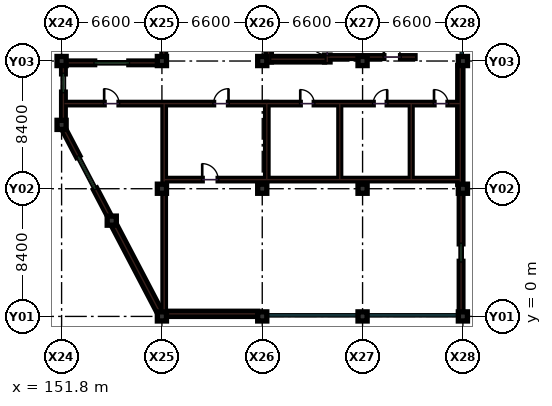
"""IFC4 building model, lengths in metres.
Left out: names, types, materials, properties, quantities, classifications, styles, units other than length and angle.
Written with IfcOpenShell. Run it as: python <this file> out.ifc"""

import sys

from ifc_helpers import new_model, si_unit, direction, frame, frame_2d, origin, origin_2d, place, context, subcontext, project, spatial, rectangle, extrude, element, fill, save


model = new_model("IFC4")
c1 = context("Model", 3, precision=1e-05, world=origin(), true_north=direction((0.0, 1.0)))
c2 = subcontext(c1, "Body", "Model", "MODEL_VIEW")
j1 = project(units=[si_unit("LENGTHUNIT", "METRE"), si_unit("PLANEANGLEUNIT", "RADIAN")], contexts=[c1])
p1 = place(None, origin())
s1 = spatial("IfcSite", under=j1, at=p1, CompositionType="ELEMENT")
p2 = place(p1, origin())
s2 = spatial("IfcBuilding", under=s1, at=p2, CompositionType="ELEMENT")
p3 = place(p2, frame((0.0, 0.0, 35.4)))
s3 = spatial("IfcBuildingStorey", under=s2, at=p3, CompositionType="ELEMENT", Elevation=35.4)
for number, where, z_axis, x_axis in (
    (1, (151.8, 16.8, 0.0), (0.0, 0.0, 1.0), (1.0, 0.0, 0.0)),
    (2, (158.4, 0.0, 0.0), (0.0, 0.0, 1.0), (1.0, 0.0, 0.0)),
    (3, (158.4, 8.4, 0.0), (0.0, 0.0, 1.0), (1.0, 0.0, 0.0)),
    (4, (158.4, 16.8, 0.0), (0.0, 0.0, 1.0), (1.0, 0.0, 0.0)),
    (5, (165.0, 0.0, 0.0), (0.0, 0.0, 1.0), (1.0, 0.0, 0.0)),
    (6, (165.0, 8.4, 0.0), (0.0, 0.0, 1.0), (1.0, 0.0, 0.0)),
    (7, (165.0, 16.8, 0.0), (0.0, 0.0, 1.0), (1.0, 0.0, 0.0)),
    (8, (171.6, 0.0, 0.0), (0.0, 0.0, 1.0), (1.0, 0.0, 0.0)),
    (9, (171.6, 8.4, 0.0), (0.0, 0.0, 1.0), (1.0, 0.0, 0.0)),
    (10, (171.6, 16.8, 0.0), (0.0, 0.0, 1.0), (1.0, 0.0, 0.0)),
    (11, (178.2, 0.0, 0.0), (0.0, 0.0, 1.0), (1.0, 0.0, 0.0)),
    (12, (178.2, 8.4, 0.0), (0.0, 0.0, 1.0), (1.0, 0.0, 0.0)),
    (13, (178.2, 16.8, 0.0), (0.0, 0.0, 1.0), (1.0, 0.0, 0.0)),
    (14, (151.8, 12.6, 0.0), (0.0, 0.0, 1.0), (1.0, 0.0, 0.0)),
    (15, (155.1, 6.3, 0.0), (0.0, 0.0, 1.0), (1.0, 0.0, 0.0)),
):
    element("IfcColumn", number, at=place(p3, frame(where, z_axis=z_axis, x_axis=x_axis)), inside=s3, PredefinedType="COLUMN", context=c2, shape_type="SweptSolid", body=[
        extrude(rectangle(XDim=0.6, YDim=0.6, at=origin_2d()), origin(), (0.0, 0.0, 1.0), 3.9),
    ])
p4 = place(p3, frame((165.3, 14.0, 0.0), z_axis=(0.0, 0.0, 1.0), x_axis=(1.0, 0.0, 0.0)))
e16 = element("IfcWall", 16, at=p4, inside=s3, PredefinedType="PARTITIONING", context=c2, shape_type="SweptSolid", body=[
    extrude(rectangle(XDim=12.7, YDim=0.16, at=frame_2d((6.35, 0.0))), origin(), (0.0, 0.0, 1.0), 2.93),
])
p5 = place(p4, frame((2.2, 0.0, 0.0)))
e17 = element("IfcOpeningElement", 17, at=p5, cuts=e16, PredefinedType="OPENING", context=c2, shape_type="SweptSolid", body=[
    extrude(rectangle(XDim=0.92, YDim=2.08, at=frame_2d((0.46, 1.04))), frame((0.0, 0.09, 0.0), z_axis=(0.0, -1.0, 0.0), x_axis=(1.0, 0.0, 0.0)), (0.0, 0.0, 1.0), 0.18),
])
p6 = place(p4, frame((7.0, 0.0, 0.0)))
e18 = element("IfcOpeningElement", 18, at=p6, cuts=e16, PredefinedType="OPENING", context=c2, shape_type="SweptSolid", body=[
    extrude(rectangle(XDim=0.92, YDim=2.08, at=frame_2d((0.46, 1.04))), frame((0.0, 0.09, 0.0), z_axis=(0.0, -1.0, 0.0), x_axis=(1.0, 0.0, 0.0)), (0.0, 0.0, 1.0), 0.18),
])
p7 = place(p4, frame((11.0, 0.0, 0.0)))
e19 = element("IfcOpeningElement", 19, at=p7, cuts=e16, PredefinedType="OPENING", context=c2, shape_type="SweptSolid", body=[
    extrude(rectangle(XDim=0.92, YDim=2.08, at=frame_2d((0.46, 1.04))), frame((0.0, 0.09, 0.0), z_axis=(0.0, -1.0, 0.0), x_axis=(1.0, 0.0, 0.0)), (0.0, 0.0, 1.0), 0.18),
])
p8 = place(p3, frame((165.3, 9.0, 0.0), z_axis=(0.0, 0.0, 1.0), x_axis=(1.0, 0.0, 0.0)))
e20 = element("IfcWall", 20, at=p8, inside=s3, PredefinedType="PARTITIONING", context=c2, shape_type="SweptSolid", body=[
    extrude(rectangle(XDim=12.7, YDim=0.16, at=frame_2d((6.35, 0.0))), origin(), (0.0, 0.0, 1.0), 2.93),
])
p9 = place(p3, frame((165.3, 9.0, 0.0), z_axis=(0.0, 0.0, 1.0), x_axis=(0.0, 1.0, 0.0)))
e21 = element("IfcWall", 21, at=p9, inside=s3, PredefinedType="PARTITIONING", context=c2, shape_type="SweptSolid", body=[
    extrude(rectangle(XDim=5.0, YDim=0.16, at=frame_2d((2.5, 0.0))), origin(), (0.0, 0.0, 1.0), 2.93),
])
for number, where, z_axis, x_axis in (
    (22, (170.1, 9.0, 0.0), (0.0, 0.0, 1.0), (0.0, 1.0, 0.0)),
    (23, (174.8, 9.0, 0.0), (0.0, 0.0, 1.0), (0.0, 1.0, 0.0)),
):
    element("IfcWall", number, at=place(p3, frame(where, z_axis=z_axis, x_axis=x_axis)), inside=s3, PredefinedType="PARTITIONING", context=c2, shape_type="SweptSolid", body=[
        extrude(rectangle(XDim=5.0, YDim=0.12, at=frame_2d((2.5, 0.0))), origin(), (0.0, 0.0, 1.0), 2.93),
    ])
p10 = place(p3, frame((158.55, 9.0, 0.0), z_axis=(0.0, 0.0, 1.0), x_axis=(1.0, 0.0, 0.0)))
e24 = element("IfcWall", 24, at=p10, inside=s3, PredefinedType="PARTITIONING", context=c2, shape_type="SweptSolid", body=[
    extrude(rectangle(XDim=6.75, YDim=0.16, at=frame_2d((3.375, 0.0))), origin(), (0.0, 0.0, 1.0), 2.93),
])
p11 = place(p10, frame((2.5, 0.0, 0.0)))
e25 = element("IfcOpeningElement", 25, at=p11, cuts=e24, PredefinedType="OPENING", context=c2, shape_type="SweptSolid", body=[
    extrude(rectangle(XDim=1.05, YDim=2.15, at=frame_2d((0.525, 1.075))), frame((0.0, 0.09, 0.0), z_axis=(0.0, -1.0, 0.0), x_axis=(1.0, 0.0, 0.0)), (0.0, 0.0, 1.0), 0.18),
])
p12 = place(p3, frame((158.55, 0.25, 0.0), z_axis=(0.0, 0.0, 1.0), x_axis=(0.0, 1.0, 0.0)))
e26 = element("IfcWall", 26, at=p12, inside=s3, PredefinedType="PARTITIONING", context=c2, shape_type="SweptSolid", body=[
    extrude(rectangle(XDim=7.7, YDim=0.16, at=frame_2d((3.85, 0.0))), origin(), (0.0, 0.0, 1.0), 2.93),
])
p13 = place(p3, frame((158.55, 8.85, 0.0), z_axis=(0.0, 0.0, 1.0), x_axis=(0.0, 1.0, 0.0)))
e27 = element("IfcWall", 27, at=p13, inside=s3, PredefinedType="PARTITIONING", context=c2, shape_type="SweptSolid", body=[
    extrude(rectangle(XDim=5.15, YDim=0.16, at=frame_2d((2.575, 0.0))), origin(), (0.0, 0.0, 1.0), 2.93),
])
p14 = place(p3, frame((152.0, 14.0, 0.0), z_axis=(0.0, 0.0, 1.0), x_axis=(1.0, 0.0, 0.0)))
e28 = element("IfcWall", 28, at=p14, inside=s3, PredefinedType="PARTITIONING", context=c2, shape_type="SweptSolid", body=[
    extrude(rectangle(XDim=13.3, YDim=0.16, at=frame_2d((6.65, 0.0))), origin(), (0.0, 0.0, 1.0), 2.93),
])
p15 = place(p14, frame((2.6, 0.0, 0.0)))
e29 = element("IfcOpeningElement", 29, at=p15, cuts=e28, PredefinedType="OPENING", context=c2, shape_type="SweptSolid", body=[
    extrude(rectangle(XDim=0.98, YDim=2.12, at=frame_2d((0.49, 1.06))), frame((0.0, 0.09, 0.0), z_axis=(0.0, -1.0, 0.0), x_axis=(1.0, 0.0, 0.0)), (0.0, 0.0, 1.0), 0.18),
])
p16 = place(p14, frame((9.8, 0.0, 0.0)))
e30 = element("IfcOpeningElement", 30, at=p16, cuts=e28, PredefinedType="OPENING", context=c2, shape_type="SweptSolid", body=[
    extrude(rectangle(XDim=0.98, YDim=2.12, at=frame_2d((0.49, 1.06))), frame((0.0, 0.09, 0.0), z_axis=(0.0, -1.0, 0.0), x_axis=(1.0, 0.0, 0.0)), (0.0, 0.0, 1.0), 0.18),
])
p17 = place(p3, frame((158.105, 16.68, 0.0), z_axis=(0.0, 0.0, 1.0), x_axis=(-1.0, 0.0, 0.0)))
e31 = element("IfcWall", 31, at=p17, inside=s3, PredefinedType="SOLIDWALL", context=c2, shape_type="SweptSolid", body=[
    extrude(rectangle(XDim=6.01, YDim=0.24, at=frame_2d((3.005, 0.0))), origin(), (0.0, 0.0, 1.0), 3.015),
])
p18 = place(p17, frame((1.88, 0.0, 0.95)))
e32 = element("IfcOpeningElement", 32, at=p18, cuts=e31, PredefinedType="OPENING", context=c2, shape_type="SweptSolid", body=[
    extrude(rectangle(XDim=2.25, YDim=1.55, at=frame_2d((1.125, 0.775))), frame((0.0, 0.13, 0.0), z_axis=(0.0, -1.0, 0.0), x_axis=(1.0, 0.0, 0.0)), (0.0, 0.0, 1.0), 0.26),
])
p19 = place(p3, frame((158.695, 0.17, 0.0), z_axis=(0.0, 0.0, 1.0), x_axis=(1.0, 0.0, 0.0)))
e33 = element("IfcWall", 33, at=p19, inside=s3, PredefinedType="SHEAR", context=c2, shape_type="SweptSolid", body=[
    extrude(rectangle(XDim=6.01, YDim=0.34, at=frame_2d((3.005, 0.0))), origin(), (0.0, 0.0, 1.0), 3.68),
])
p20 = place(p3, frame((158.52, 24.905, 0.0), z_axis=(0.0, 0.0, 1.0), x_axis=(0.0, -1.0, 0.0)))
e34 = element("IfcWall", 34, at=p20, inside=s3, PredefinedType="SOLIDWALL", context=c2, shape_type="SweptSolid", body=[
    extrude(rectangle(XDim=7.81, YDim=0.24, at=frame_2d((3.905, 0.0))), origin(), (0.0, 0.0, 1.0), 3.065),
])
p21 = place(p20, frame((3.005, 0.0, 0.95)))
e35 = element("IfcOpeningElement", 35, at=p21, cuts=e34, PredefinedType="OPENING", context=c2, shape_type="SweptSolid", body=[
    extrude(rectangle(XDim=1.8, YDim=1.6, at=frame_2d((0.9, 0.8))), frame((0.0, 0.13, 0.0), z_axis=(0.0, -1.0, 0.0), x_axis=(1.0, 0.0, 0.0)), (0.0, 0.0, 1.0), 0.26),
])
p22 = place(p3, frame((178.08, 0.295, 0.0), z_axis=(0.0, 0.0, 1.0), x_axis=(0.0, 1.0, 0.0)))
e36 = element("IfcWall", 36, at=p22, inside=s3, PredefinedType="SOLIDWALL", context=c2, shape_type="SweptSolid", body=[
    extrude(rectangle(XDim=7.81, YDim=0.24, at=frame_2d((3.905, 0.0))), origin(), (0.0, 0.0, 1.0), 3.065),
])
p23 = place(p22, frame((3.33, 0.0, 0.95)))
e37 = element("IfcOpeningElement", 37, at=p23, cuts=e36, PredefinedType="OPENING", context=c2, shape_type="SweptSolid", body=[
    extrude(rectangle(XDim=1.15, YDim=1.6, at=frame_2d((0.575, 0.8))), frame((0.0, 0.13, 0.0), z_axis=(0.0, -1.0, 0.0), x_axis=(1.0, 0.0, 0.0)), (0.0, 0.0, 1.0), 0.26),
])
p24 = place(p3, frame((178.03, 8.695, 0.0), z_axis=(0.0, 0.0, 1.0), x_axis=(0.0, 1.0, 0.0)))
e38 = element("IfcWall", 38, at=p24, inside=s3, PredefinedType="SHEAR", context=c2, shape_type="SweptSolid", body=[
    extrude(rectangle(XDim=7.81, YDim=0.34, at=frame_2d((3.905, 0.0))), origin(), (0.0, 0.0, 1.0), 3.68),
])
p25 = place(p3, frame((151.92, 16.505, 0.0), z_axis=(0.0, 0.0, 1.0), x_axis=(0.0, -1.0, 0.0)))
e39 = element("IfcWall", 39, at=p25, inside=s3, PredefinedType="SOLIDWALL", context=c2, shape_type="SweptSolid", body=[
    extrude(rectangle(XDim=3.61, YDim=0.24, at=frame_2d((1.805, 0.0))), origin(), (0.0, 0.0, 1.0), 3.065),
])
p26 = place(p25, frame((0.55, 0.0, 0.95)))
e40 = element("IfcOpeningElement", 40, at=p26, cuts=e39, PredefinedType="OPENING", context=c2, shape_type="SweptSolid", body=[
    extrude(rectangle(XDim=1.2, YDim=1.5, at=frame_2d((0.6, 0.75))), frame((0.0, 0.13, 0.0), z_axis=(0.0, -1.0, 0.0), x_axis=(1.0, 0.0, 0.0)), (0.0, 0.0, 1.0), 0.26),
])
p27 = place(p3, frame((151.95, 12.31, 0.0), z_axis=(0.0, 0.0, 1.0), x_axis=(0.464471613901, -0.885588007981, 0.0)))
e41 = element("IfcWall", 41, at=p27, inside=s3, PredefinedType="SOLIDWALL", context=c2, shape_type="SweptSolid", body=[
    extrude(rectangle(XDim=6.459, YDim=0.24, at=frame_2d((3.229, 0.0))), origin(), (0.0, 0.0, 1.0), 3.065),
])
p28 = place(p27, frame((2.03, 0.0, 0.95)))
e42 = element("IfcOpeningElement", 42, at=p28, cuts=e41, PredefinedType="OPENING", context=c2, shape_type="SweptSolid", body=[
    extrude(rectangle(XDim=2.4, YDim=1.6, at=frame_2d((1.2, 0.8))), frame((0.0, 0.13, 0.0), z_axis=(0.0, -1.0, 0.0), x_axis=(1.0, 0.0, 0.0)), (0.0, 0.0, 1.0), 0.26),
])
p29 = place(p3, frame((155.25, 6.01, 0.0), z_axis=(0.0, 0.0, 1.0), x_axis=(0.464471613901, -0.885588007981, 0.0)))
e43 = element("IfcWall", 43, at=p29, inside=s3, PredefinedType="SHEAR", context=c2, shape_type="SweptSolid", body=[
    extrude(rectangle(XDim=6.459, YDim=0.34, at=frame_2d((3.229, 0.0))), origin(), (0.0, 0.0, 1.0), 3.68),
])
p30 = place(p3, frame((165.42, 16.74, 0.0), z_axis=(0.0, 0.0, 1.0), x_axis=(0.0, 1.0, 0.0)))
e44 = element("IfcWall", 44, at=p30, inside=s3, PredefinedType="SHEAR", context=c2, shape_type="SweptSolid", body=[
    extrude(rectangle(XDim=8.37, YDim=0.36, at=frame_2d((4.185, 0.0))), origin(), (0.0, 0.0, 1.0), 3.68),
])
p31 = place(p3, frame((169.28, 16.74, 0.0), z_axis=(0.0, 0.0, 1.0), x_axis=(0.0, 1.0, 0.0)))
e45 = element("IfcWall", 45, at=p31, inside=s3, PredefinedType="SHEAR", context=c2, shape_type="SweptSolid", body=[
    extrude(rectangle(XDim=8.37, YDim=0.36, at=frame_2d((4.185, 0.0))), origin(), (0.0, 0.0, 1.0), 3.68),
])
p32 = place(p31, frame((0.45, 0.0, 0.0)))
e46 = element("IfcOpeningElement", 46, at=p32, cuts=e45, PredefinedType="OPENING", context=c2, shape_type="SweptSolid", body=[
    extrude(rectangle(XDim=1.25, YDim=2.15, at=frame_2d((0.625, 1.075))), frame((0.0, 0.19, 0.0), z_axis=(0.0, -1.0, 0.0), x_axis=(1.0, 0.0, 0.0)), (0.0, 0.0, 1.0), 0.38),
])
p33 = place(p3, frame((165.6, 16.92, 0.0), z_axis=(0.0, 0.0, 1.0), x_axis=(1.0, 0.0, 0.0)))
e47 = element("IfcWall", 47, at=p33, inside=s3, PredefinedType="SHEAR", context=c2, shape_type="SweptSolid", body=[
    extrude(rectangle(XDim=3.5, YDim=0.36, at=frame_2d((1.75, 0.0))), origin(), (0.0, 0.0, 1.0), 3.68),
])
p34 = place(p3, frame((169.35, 17.06, 0.0), z_axis=(0.0, 0.0, 1.0), x_axis=(1.0, 0.0, 0.0)))
e48 = element("IfcWall", 48, at=p34, inside=s3, PredefinedType="SOLIDWALL", context=c2, shape_type="SweptSolid", body=[
    extrude(rectangle(XDim=5.7, YDim=0.18, at=frame_2d((2.85, 0.0))), origin(), (0.0, 0.0, 1.0), 3.015),
])
p35 = place(p34, frame((3.65, 0.0, 0.0)))
e49 = element("IfcOpeningElement", 49, at=p35, cuts=e48, PredefinedType="OPENING", context=c2, shape_type="SweptSolid", body=[
    extrude(rectangle(XDim=1.1, YDim=2.15, at=frame_2d((0.55, 1.075))), frame((0.0, 0.1, 0.0), z_axis=(0.0, -1.0, 0.0), x_axis=(1.0, 0.0, 0.0)), (0.0, 0.0, 1.0), 0.2),
])
p36 = place(p5, origin())
e50 = element("IfcDoor", 50, at=p36, inside=s3, OperationType="SINGLE_SWING_LEFT", PredefinedType="DOOR", context=c2, shape_type="SweptSolid", body=[
    extrude(rectangle(XDim=0.92, YDim=2.08, at=frame_2d((0.46, 1.04))), frame((0.0, 0.025, 0.0), z_axis=(0.0, -1.0, 0.0), x_axis=(1.0, 0.0, 0.0)), (0.0, 0.0, 1.0), 0.05),
])
fill(e17, e50)
p37 = place(p6, origin())
e51 = element("IfcDoor", 51, at=p37, inside=s3, OperationType="SINGLE_SWING_RIGHT", PredefinedType="DOOR", context=c2, shape_type="SweptSolid", body=[
    extrude(rectangle(XDim=0.92, YDim=2.08, at=frame_2d((0.46, 1.04))), frame((0.0, 0.025, 0.0), z_axis=(0.0, -1.0, 0.0), x_axis=(1.0, 0.0, 0.0)), (0.0, 0.0, 1.0), 0.05),
])
fill(e18, e51)
p38 = place(p7, origin())
e52 = element("IfcDoor", 52, at=p38, inside=s3, OperationType="SINGLE_SWING_LEFT", PredefinedType="DOOR", context=c2, shape_type="SweptSolid", body=[
    extrude(rectangle(XDim=0.92, YDim=2.08, at=frame_2d((0.46, 1.04))), frame((0.0, 0.025, 0.0), z_axis=(0.0, -1.0, 0.0), x_axis=(1.0, 0.0, 0.0)), (0.0, 0.0, 1.0), 0.05),
])
fill(e19, e52)
p39 = place(p11, origin())
e53 = element("IfcDoor", 53, at=p39, inside=s3, OperationType="SINGLE_SWING_LEFT", PredefinedType="DOOR", context=c2, shape_type="SweptSolid", body=[
    extrude(rectangle(XDim=1.05, YDim=2.15, at=frame_2d((0.525, 1.075))), frame((0.0, 0.025, 0.0), z_axis=(0.0, -1.0, 0.0), x_axis=(1.0, 0.0, 0.0)), (0.0, 0.0, 1.0), 0.05),
])
fill(e25, e53)
p40 = place(p15, origin())
e54 = element("IfcDoor", 54, at=p40, inside=s3, OperationType="SINGLE_SWING_LEFT", PredefinedType="DOOR", context=c2, shape_type="SweptSolid", body=[
    extrude(rectangle(XDim=0.98, YDim=2.12, at=frame_2d((0.49, 1.06))), frame((0.0, 0.025, 0.0), z_axis=(0.0, -1.0, 0.0), x_axis=(1.0, 0.0, 0.0)), (0.0, 0.0, 1.0), 0.05),
])
fill(e29, e54)
p41 = place(p16, origin())
e55 = element("IfcDoor", 55, at=p41, inside=s3, OperationType="SINGLE_SWING_RIGHT", PredefinedType="DOOR", context=c2, shape_type="SweptSolid", body=[
    extrude(rectangle(XDim=0.98, YDim=2.12, at=frame_2d((0.49, 1.06))), frame((0.0, 0.025, 0.0), z_axis=(0.0, -1.0, 0.0), x_axis=(1.0, 0.0, 0.0)), (0.0, 0.0, 1.0), 0.05),
])
fill(e30, e55)
p42 = place(p18, origin())
e56 = element("IfcWindow", 56, at=p42, inside=s3, PartitioningType="SINGLE_PANEL", PredefinedType="WINDOW", context=c2, shape_type="SweptSolid", body=[
    extrude(rectangle(XDim=2.25, YDim=1.55, at=frame_2d((1.125, 0.775))), frame((0.0, 0.03, 0.0), z_axis=(0.0, -1.0, 0.0), x_axis=(1.0, 0.0, 0.0)), (0.0, 0.0, 1.0), 0.06),
])
fill(e32, e56)
p43 = place(p23, origin())
e57 = element("IfcWindow", 57, at=p43, inside=s3, PartitioningType="SINGLE_PANEL", PredefinedType="WINDOW", context=c2, shape_type="SweptSolid", body=[
    extrude(rectangle(XDim=1.15, YDim=1.6, at=frame_2d((0.575, 0.8))), frame((0.0, 0.03, 0.0), z_axis=(0.0, -1.0, 0.0), x_axis=(1.0, 0.0, 0.0)), (0.0, 0.0, 1.0), 0.06),
])
fill(e37, e57)
p44 = place(p26, origin())
e58 = element("IfcWindow", 58, at=p44, inside=s3, PartitioningType="SINGLE_PANEL", PredefinedType="WINDOW", context=c2, shape_type="SweptSolid", body=[
    extrude(rectangle(XDim=1.2, YDim=1.5, at=frame_2d((0.6, 0.75))), frame((0.0, 0.03, 0.0), z_axis=(0.0, -1.0, 0.0), x_axis=(1.0, 0.0, 0.0)), (0.0, 0.0, 1.0), 0.06),
])
fill(e40, e58)
p45 = place(p28, origin())
e59 = element("IfcWindow", 59, at=p45, inside=s3, PartitioningType="SINGLE_PANEL", PredefinedType="WINDOW", context=c2, shape_type="SweptSolid", body=[
    extrude(rectangle(XDim=2.4, YDim=1.6, at=frame_2d((1.2, 0.8))), frame((0.0, 0.03, 0.0), z_axis=(0.0, -1.0, 0.0), x_axis=(1.0, 0.0, 0.0)), (0.0, 0.0, 1.0), 0.06),
])
fill(e42, e59)
p46 = place(p32, origin())
e60 = element("IfcDoor", 60, at=p46, inside=s3, OperationType="SINGLE_SWING_RIGHT", PredefinedType="DOOR", context=c2, shape_type="SweptSolid", body=[
    extrude(rectangle(XDim=1.25, YDim=2.15, at=frame_2d((0.625, 1.075))), frame((0.0, 0.025, 0.0), z_axis=(0.0, -1.0, 0.0), x_axis=(1.0, 0.0, 0.0)), (0.0, 0.0, 1.0), 0.05),
])
fill(e46, e60)
p47 = place(p35, origin())
e61 = element("IfcDoor", 61, at=p47, inside=s3, OperationType="SINGLE_SWING_LEFT", PredefinedType="DOOR", context=c2, shape_type="SweptSolid", body=[
    extrude(rectangle(XDim=1.1, YDim=2.15, at=frame_2d((0.55, 1.075))), frame((0.0, 0.025, 0.0), z_axis=(0.0, -1.0, 0.0), x_axis=(1.0, 0.0, 0.0)), (0.0, 0.0, 1.0), 0.05),
])
fill(e49, e61)
save(model, sys.argv[1])
